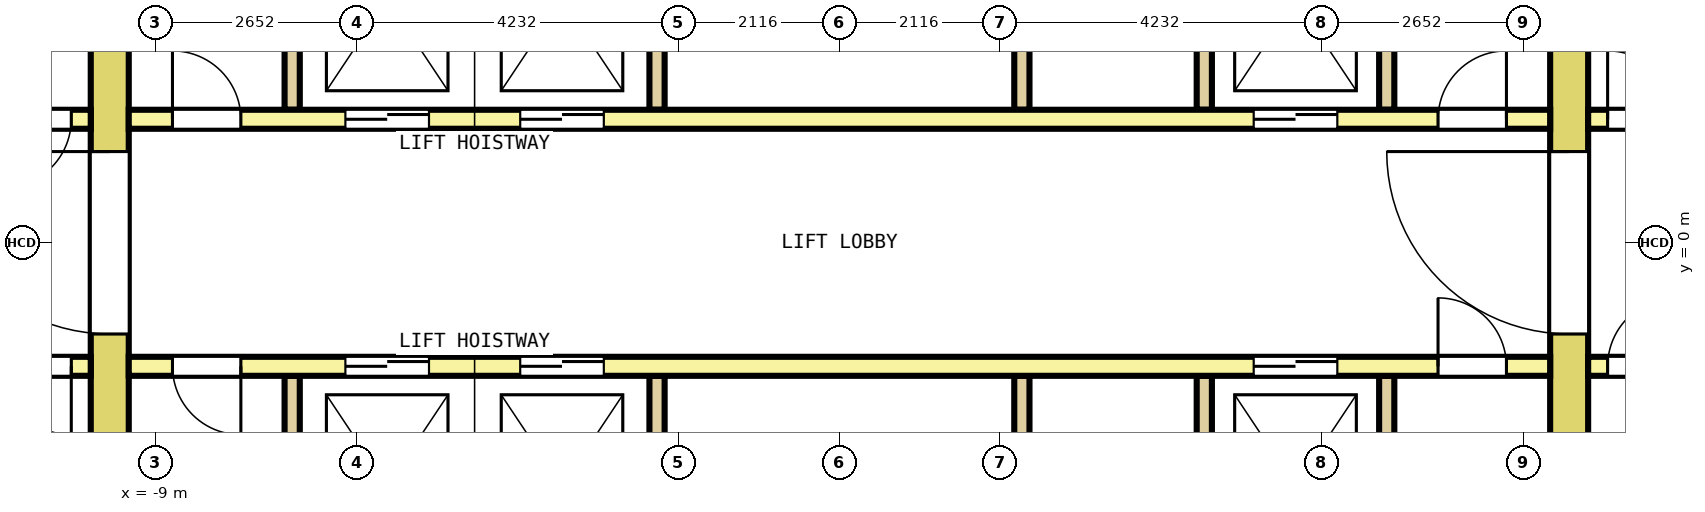
"""IFC4 building model, lengths in metres.
Left out: names, types, materials, properties, quantities, classifications, styles, units other than length and angle.
Written with IfcOpenShell. Run it as: python <this file> out.ifc"""

import sys

from ifc_helpers import new_model, si_unit, direction, frame, frame_2d, origin, place, context, subcontext, project, spatial, rectangle, extrude, element, fill, save


model = new_model("IFC4")
c1 = context("Model", 3, precision=1e-05, world=origin(), true_north=direction((0.0, 1.0)))
c2 = subcontext(c1, "Body", "Model", "MODEL_VIEW")
j1 = project(units=[si_unit("LENGTHUNIT", "METRE"), si_unit("PLANEANGLEUNIT", "RADIAN")], contexts=[c1])
p1 = place(None, origin())
s1 = spatial("IfcSite", under=j1, at=p1, CompositionType="ELEMENT")
p2 = place(p1, origin())
s2 = spatial("IfcBuilding", under=s1, at=p2, CompositionType="ELEMENT")
p3 = place(p2, frame((0.0, 0.0, 122.0)))
s3 = spatial("IfcBuildingStorey", under=s2, at=p3, CompositionType="ELEMENT", Elevation=122.0)
p4 = place(p3, frame((-9.6, -7.7, 0.0), z_axis=(0.0, 0.0, 1.0), x_axis=(0.0, 1.0, 0.0)))
e1 = element("IfcWall", 1, at=p4, inside=s3, PredefinedType="SHEAR", context=c2, shape_type="SweptSolid", body=[
    extrude(rectangle(XDim=15.4, YDim=0.5, at=frame_2d((7.7, 0.0))), origin(), (0.0, 0.0, 1.0), 4.1),
])
p5 = place(p4, frame((6.5, 0.0, 0.0)))
e2 = element("IfcOpeningElement", 2, at=p5, cuts=e1, PredefinedType="OPENING", context=c2, shape_type="SweptSolid", body=[
    extrude(rectangle(XDim=2.4, YDim=2.1, at=frame_2d((1.2, 1.05))), frame((0.0, 0.26, 0.0), z_axis=(0.0, -1.0, 0.0), x_axis=(1.0, 0.0, 0.0)), (0.0, 0.0, 1.0), 0.52),
])
p6 = place(p4, frame((13.4, 0.0, 0.0)))
e3 = element("IfcOpeningElement", 3, at=p6, cuts=e1, PredefinedType="OPENING", context=c2, shape_type="SweptSolid", body=[
    extrude(rectangle(XDim=1.2, YDim=2.1, at=frame_2d((0.6, 1.05))), frame((0.0, 0.26, 0.0), z_axis=(0.0, -1.0, 0.0), x_axis=(1.0, 0.0, 0.0)), (0.0, 0.0, 1.0), 0.52),
])
p7 = place(p4, frame((0.8, 0.0, 0.0)))
e4 = element("IfcOpeningElement", 4, at=p7, cuts=e1, PredefinedType="OPENING", context=c2, shape_type="SweptSolid", body=[
    extrude(rectangle(XDim=1.2, YDim=2.1, at=frame_2d((0.6, 1.05))), frame((0.0, 0.26, 0.0), z_axis=(0.0, -1.0, 0.0), x_axis=(1.0, 0.0, 0.0)), (0.0, 0.0, 1.0), 0.52),
])
p8 = place(p3, frame((9.6, -7.7, 0.0), z_axis=(0.0, 0.0, 1.0), x_axis=(0.0, 1.0, 0.0)))
e5 = element("IfcWall", 5, at=p8, inside=s3, PredefinedType="SHEAR", context=c2, shape_type="SweptSolid", body=[
    extrude(rectangle(XDim=15.4, YDim=0.5, at=frame_2d((7.7, 0.0))), origin(), (0.0, 0.0, 1.0), 4.1),
])
p9 = place(p8, frame((6.5, 0.0, 0.0)))
e6 = element("IfcOpeningElement", 6, at=p9, cuts=e5, PredefinedType="OPENING", context=c2, shape_type="SweptSolid", body=[
    extrude(rectangle(XDim=2.4, YDim=2.1, at=frame_2d((1.2, 1.05))), frame((0.0, 0.26, 0.0), z_axis=(0.0, -1.0, 0.0), x_axis=(1.0, 0.0, 0.0)), (0.0, 0.0, 1.0), 0.52),
])
p10 = place(p8, frame((13.4, 0.0, 0.0)))
e7 = element("IfcOpeningElement", 7, at=p10, cuts=e5, PredefinedType="OPENING", context=c2, shape_type="SweptSolid", body=[
    extrude(rectangle(XDim=1.2, YDim=2.1, at=frame_2d((0.6, 1.05))), frame((0.0, 0.26, 0.0), z_axis=(0.0, -1.0, 0.0), x_axis=(1.0, 0.0, 0.0)), (0.0, 0.0, 1.0), 0.52),
])
p11 = place(p8, frame((0.9, 0.0, 0.0)))
e8 = element("IfcOpeningElement", 8, at=p11, cuts=e5, PredefinedType="OPENING", context=c2, shape_type="SweptSolid", body=[
    extrude(rectangle(XDim=1.0, YDim=2.1, at=frame_2d((0.5, 1.05))), frame((0.0, 0.26, 0.0), z_axis=(0.0, -1.0, 0.0), x_axis=(1.0, 0.0, 0.0)), (0.0, 0.0, 1.0), 0.52),
])
p12 = place(p3, frame((-12.8, 1.625, 0.0), z_axis=(0.0, 0.0, 1.0), x_axis=(1.0, 0.0, 0.0)))
e9 = element("IfcWall", 9, at=p12, inside=s3, PredefinedType="SOLIDWALL", context=c2, shape_type="SweptSolid", body=[
    extrude(rectangle(XDim=2.95, YDim=0.25, at=frame_2d((1.475, 0.0))), origin(), (0.0, 0.0, 1.0), 4.1),
])
p13 = place(p12, frame((0.256, 0.0, 0.0)))
e10 = element("IfcOpeningElement", 10, at=p13, cuts=e9, PredefinedType="OPENING", context=c2, shape_type="SweptSolid", body=[
    extrude(rectangle(XDim=0.9, YDim=2.1, at=frame_2d((0.45, 1.05))), frame((0.0, 0.135, 0.0), z_axis=(0.0, -1.0, 0.0), x_axis=(1.0, 0.0, 0.0)), (0.0, 0.0, 1.0), 0.27),
])
p14 = place(p12, frame((1.794, 0.0, 0.0)))
e11 = element("IfcOpeningElement", 11, at=p14, cuts=e9, PredefinedType="OPENING", context=c2, shape_type="SweptSolid", body=[
    extrude(rectangle(XDim=0.9, YDim=2.1, at=frame_2d((0.45, 1.05))), frame((0.0, 0.135, 0.0), z_axis=(0.0, -1.0, 0.0), x_axis=(1.0, 0.0, 0.0)), (0.0, 0.0, 1.0), 0.27),
])
p15 = place(p3, frame((-9.35, 1.625, 0.0), z_axis=(0.0, 0.0, 1.0), x_axis=(1.0, 0.0, 0.0)))
e12 = element("IfcWall", 12, at=p15, inside=s3, PredefinedType="SOLIDWALL", context=c2, shape_type="SweptSolid", body=[
    extrude(rectangle(XDim=18.7, YDim=0.25, at=frame_2d((9.35, 0.0))), origin(), (0.0, 0.0, 1.0), 4.1),
])
p16 = place(p15, frame((2.85, 0.0, 0.0)))
e13 = element("IfcOpeningElement", 13, at=p16, cuts=e12, PredefinedType="OPENING", context=c2, shape_type="SweptSolid", body=[
    extrude(rectangle(XDim=1.1, YDim=2.1, at=frame_2d((0.55, 1.05))), frame((0.0, 0.135, 0.0), z_axis=(0.0, -1.0, 0.0), x_axis=(1.0, 0.0, 0.0)), (0.0, 0.0, 1.0), 0.27),
])
p17 = place(p15, frame((5.15, 0.0, 0.0)))
e14 = element("IfcOpeningElement", 14, at=p17, cuts=e12, PredefinedType="OPENING", context=c2, shape_type="SweptSolid", body=[
    extrude(rectangle(XDim=1.1, YDim=2.1, at=frame_2d((0.55, 1.05))), frame((0.0, 0.135, 0.0), z_axis=(0.0, -1.0, 0.0), x_axis=(1.0, 0.0, 0.0)), (0.0, 0.0, 1.0), 0.27),
])
p18 = place(p15, frame((14.8, 0.0, 0.0)))
e15 = element("IfcOpeningElement", 15, at=p18, cuts=e12, PredefinedType="OPENING", context=c2, shape_type="SweptSolid", body=[
    extrude(rectangle(XDim=1.1, YDim=2.1, at=frame_2d((0.55, 1.05))), frame((0.0, 0.135, 0.0), z_axis=(0.0, -1.0, 0.0), x_axis=(1.0, 0.0, 0.0)), (0.0, 0.0, 1.0), 0.27),
])
p19 = place(p15, frame((0.575, 0.0, 0.0)))
e16 = element("IfcOpeningElement", 16, at=p19, cuts=e12, PredefinedType="OPENING", context=c2, shape_type="SweptSolid", body=[
    extrude(rectangle(XDim=0.9, YDim=2.1, at=frame_2d((0.45, 1.05))), frame((0.0, 0.135, 0.0), z_axis=(0.0, -1.0, 0.0), x_axis=(1.0, 0.0, 0.0)), (0.0, 0.0, 1.0), 0.27),
])
p20 = place(p15, frame((17.225, 0.0, 0.0)))
e17 = element("IfcOpeningElement", 17, at=p20, cuts=e12, PredefinedType="OPENING", context=c2, shape_type="SweptSolid", body=[
    extrude(rectangle(XDim=0.9, YDim=2.1, at=frame_2d((0.45, 1.05))), frame((0.0, 0.135, 0.0), z_axis=(0.0, -1.0, 0.0), x_axis=(1.0, 0.0, 0.0)), (0.0, 0.0, 1.0), 0.27),
])
p21 = place(p3, frame((9.85, 1.625, 0.0), z_axis=(0.0, 0.0, 1.0), x_axis=(1.0, 0.0, 0.0)))
e18 = element("IfcWall", 18, at=p21, inside=s3, PredefinedType="SOLIDWALL", context=c2, shape_type="SweptSolid", body=[
    extrude(rectangle(XDim=2.95, YDim=0.25, at=frame_2d((1.475, 0.0))), origin(), (0.0, 0.0, 1.0), 4.1),
])
p22 = place(p21, frame((0.256, 0.0, 0.0)))
e19 = element("IfcOpeningElement", 19, at=p22, cuts=e18, PredefinedType="OPENING", context=c2, shape_type="SweptSolid", body=[
    extrude(rectangle(XDim=0.9, YDim=2.1, at=frame_2d((0.45, 1.05))), frame((0.0, 0.135, 0.0), z_axis=(0.0, -1.0, 0.0), x_axis=(1.0, 0.0, 0.0)), (0.0, 0.0, 1.0), 0.27),
])
p23 = place(p21, frame((1.794, 0.0, 0.0)))
e20 = element("IfcOpeningElement", 20, at=p23, cuts=e18, PredefinedType="OPENING", context=c2, shape_type="SweptSolid", body=[
    extrude(rectangle(XDim=0.9, YDim=2.1, at=frame_2d((0.45, 1.05))), frame((0.0, 0.135, 0.0), z_axis=(0.0, -1.0, 0.0), x_axis=(1.0, 0.0, 0.0)), (0.0, 0.0, 1.0), 0.27),
])
for number, where, z_axis, x_axis in (
    (21, (-7.2, 1.75, 0.0), (0.0, 0.0, 1.0), (0.0, 1.0, 0.0)),
    (22, (-2.4, 1.75, 0.0), (0.0, 0.0, 1.0), (0.0, 1.0, 0.0)),
    (23, (2.4, 1.75, 0.0), (0.0, 0.0, 1.0), (0.0, 1.0, 0.0)),
    (24, (4.8, 1.75, 0.0), (0.0, 0.0, 1.0), (0.0, 1.0, 0.0)),
    (25, (7.2, 1.75, 0.0), (0.0, 0.0, 1.0), (0.0, 1.0, 0.0)),
):
    element("IfcWall", number, at=place(p3, frame(where, z_axis=z_axis, x_axis=x_axis)), inside=s3, PredefinedType="SOLIDWALL", context=c2, shape_type="SweptSolid", body=[
        extrude(rectangle(XDim=2.9, YDim=0.2, at=frame_2d((1.45, 0.0))), origin(), (0.0, 0.0, 1.0), 4.1),
    ])
p24 = place(p3, frame((-12.8, -1.625, 0.0), z_axis=(0.0, 0.0, 1.0), x_axis=(1.0, 0.0, 0.0)))
e26 = element("IfcWall", 26, at=p24, inside=s3, PredefinedType="SOLIDWALL", context=c2, shape_type="SweptSolid", body=[
    extrude(rectangle(XDim=2.95, YDim=0.25, at=frame_2d((1.475, 0.0))), origin(), (0.0, 0.0, 1.0), 4.1),
])
p25 = place(p24, frame((0.256, 0.0, 0.0)))
e27 = element("IfcOpeningElement", 27, at=p25, cuts=e26, PredefinedType="OPENING", context=c2, shape_type="SweptSolid", body=[
    extrude(rectangle(XDim=0.9, YDim=2.1, at=frame_2d((0.45, 1.05))), frame((0.0, 0.135, 0.0), z_axis=(0.0, -1.0, 0.0), x_axis=(1.0, 0.0, 0.0)), (0.0, 0.0, 1.0), 0.27),
])
p26 = place(p24, frame((1.794, 0.0, 0.0)))
e28 = element("IfcOpeningElement", 28, at=p26, cuts=e26, PredefinedType="OPENING", context=c2, shape_type="SweptSolid", body=[
    extrude(rectangle(XDim=0.9, YDim=2.1, at=frame_2d((0.45, 1.05))), frame((0.0, 0.135, 0.0), z_axis=(0.0, -1.0, 0.0), x_axis=(1.0, 0.0, 0.0)), (0.0, 0.0, 1.0), 0.27),
])
p27 = place(p3, frame((-9.35, -1.625, 0.0), z_axis=(0.0, 0.0, 1.0), x_axis=(1.0, 0.0, 0.0)))
e29 = element("IfcWall", 29, at=p27, inside=s3, PredefinedType="SOLIDWALL", context=c2, shape_type="SweptSolid", body=[
    extrude(rectangle(XDim=18.7, YDim=0.25, at=frame_2d((9.35, 0.0))), origin(), (0.0, 0.0, 1.0), 4.1),
])
p28 = place(p27, frame((2.85, 0.0, 0.0)))
e30 = element("IfcOpeningElement", 30, at=p28, cuts=e29, PredefinedType="OPENING", context=c2, shape_type="SweptSolid", body=[
    extrude(rectangle(XDim=1.1, YDim=2.1, at=frame_2d((0.55, 1.05))), frame((0.0, 0.135, 0.0), z_axis=(0.0, -1.0, 0.0), x_axis=(1.0, 0.0, 0.0)), (0.0, 0.0, 1.0), 0.27),
])
p29 = place(p27, frame((5.15, 0.0, 0.0)))
e31 = element("IfcOpeningElement", 31, at=p29, cuts=e29, PredefinedType="OPENING", context=c2, shape_type="SweptSolid", body=[
    extrude(rectangle(XDim=1.1, YDim=2.1, at=frame_2d((0.55, 1.05))), frame((0.0, 0.135, 0.0), z_axis=(0.0, -1.0, 0.0), x_axis=(1.0, 0.0, 0.0)), (0.0, 0.0, 1.0), 0.27),
])
p30 = place(p27, frame((14.8, 0.0, 0.0)))
e32 = element("IfcOpeningElement", 32, at=p30, cuts=e29, PredefinedType="OPENING", context=c2, shape_type="SweptSolid", body=[
    extrude(rectangle(XDim=1.1, YDim=2.1, at=frame_2d((0.55, 1.05))), frame((0.0, 0.135, 0.0), z_axis=(0.0, -1.0, 0.0), x_axis=(1.0, 0.0, 0.0)), (0.0, 0.0, 1.0), 0.27),
])
p31 = place(p27, frame((0.575, 0.0, 0.0)))
e33 = element("IfcOpeningElement", 33, at=p31, cuts=e29, PredefinedType="OPENING", context=c2, shape_type="SweptSolid", body=[
    extrude(rectangle(XDim=0.9, YDim=2.1, at=frame_2d((0.45, 1.05))), frame((0.0, 0.135, 0.0), z_axis=(0.0, -1.0, 0.0), x_axis=(1.0, 0.0, 0.0)), (0.0, 0.0, 1.0), 0.27),
])
p32 = place(p27, frame((17.225, 0.0, 0.0)))
e34 = element("IfcOpeningElement", 34, at=p32, cuts=e29, PredefinedType="OPENING", context=c2, shape_type="SweptSolid", body=[
    extrude(rectangle(XDim=0.9, YDim=2.1, at=frame_2d((0.45, 1.05))), frame((0.0, 0.135, 0.0), z_axis=(0.0, -1.0, 0.0), x_axis=(1.0, 0.0, 0.0)), (0.0, 0.0, 1.0), 0.27),
])
p33 = place(p3, frame((9.85, -1.625, 0.0), z_axis=(0.0, 0.0, 1.0), x_axis=(1.0, 0.0, 0.0)))
e35 = element("IfcWall", 35, at=p33, inside=s3, PredefinedType="SOLIDWALL", context=c2, shape_type="SweptSolid", body=[
    extrude(rectangle(XDim=2.95, YDim=0.25, at=frame_2d((1.475, 0.0))), origin(), (0.0, 0.0, 1.0), 4.1),
])
p34 = place(p33, frame((0.256, 0.0, 0.0)))
e36 = element("IfcOpeningElement", 36, at=p34, cuts=e35, PredefinedType="OPENING", context=c2, shape_type="SweptSolid", body=[
    extrude(rectangle(XDim=0.9, YDim=2.1, at=frame_2d((0.45, 1.05))), frame((0.0, 0.135, 0.0), z_axis=(0.0, -1.0, 0.0), x_axis=(1.0, 0.0, 0.0)), (0.0, 0.0, 1.0), 0.27),
])
p35 = place(p33, frame((1.794, 0.0, 0.0)))
e37 = element("IfcOpeningElement", 37, at=p35, cuts=e35, PredefinedType="OPENING", context=c2, shape_type="SweptSolid", body=[
    extrude(rectangle(XDim=0.9, YDim=2.1, at=frame_2d((0.45, 1.05))), frame((0.0, 0.135, 0.0), z_axis=(0.0, -1.0, 0.0), x_axis=(1.0, 0.0, 0.0)), (0.0, 0.0, 1.0), 0.27),
])
for number, where, z_axis, x_axis in (
    (38, (-7.2, -4.65, 0.0), (0.0, 0.0, 1.0), (0.0, 1.0, 0.0)),
    (39, (-2.4, -4.65, 0.0), (0.0, 0.0, 1.0), (0.0, 1.0, 0.0)),
    (40, (2.4, -4.65, 0.0), (0.0, 0.0, 1.0), (0.0, 1.0, 0.0)),
    (41, (4.8, -4.65, 0.0), (0.0, 0.0, 1.0), (0.0, 1.0, 0.0)),
    (42, (7.2, -4.65, 0.0), (0.0, 0.0, 1.0), (0.0, 1.0, 0.0)),
):
    element("IfcWall", number, at=place(p3, frame(where, z_axis=z_axis, x_axis=x_axis)), inside=s3, PredefinedType="SOLIDWALL", context=c2, shape_type="SweptSolid", body=[
        extrude(rectangle(XDim=2.9, YDim=0.2, at=frame_2d((1.45, 0.0))), origin(), (0.0, 0.0, 1.0), 4.1),
    ])
p36 = place(p16, origin())
e43 = element("IfcDoor", 43, at=p36, inside=s3, OperationType="DOUBLE_DOOR_SLIDING", PredefinedType="DOOR", context=c2, shape_type="SweptSolid", body=[
    extrude(rectangle(XDim=1.1, YDim=2.1, at=frame_2d((0.55, 1.05))), frame((0.0, 0.075, 0.0), z_axis=(0.0, -1.0, 0.0), x_axis=(1.0, 0.0, 0.0)), (0.0, 0.0, 1.0), 0.15),
])
fill(e13, e43)
p37 = place(p17, origin())
e44 = element("IfcDoor", 44, at=p37, inside=s3, OperationType="DOUBLE_DOOR_SLIDING", PredefinedType="DOOR", context=c2, shape_type="SweptSolid", body=[
    extrude(rectangle(XDim=1.1, YDim=2.1, at=frame_2d((0.55, 1.05))), frame((0.0, 0.075, 0.0), z_axis=(0.0, -1.0, 0.0), x_axis=(1.0, 0.0, 0.0)), (0.0, 0.0, 1.0), 0.15),
])
fill(e14, e44)
p38 = place(p18, origin())
e45 = element("IfcDoor", 45, at=p38, inside=s3, OperationType="DOUBLE_DOOR_SLIDING", PredefinedType="DOOR", context=c2, shape_type="SweptSolid", body=[
    extrude(rectangle(XDim=1.1, YDim=2.1, at=frame_2d((0.55, 1.05))), frame((0.0, 0.075, 0.0), z_axis=(0.0, -1.0, 0.0), x_axis=(1.0, 0.0, 0.0)), (0.0, 0.0, 1.0), 0.15),
])
fill(e15, e45)
p39 = place(p28, origin())
e46 = element("IfcDoor", 46, at=p39, inside=s3, OperationType="DOUBLE_DOOR_SLIDING", PredefinedType="DOOR", context=c2, shape_type="SweptSolid", body=[
    extrude(rectangle(XDim=1.1, YDim=2.1, at=frame_2d((0.55, 1.05))), frame((0.0, 0.075, 0.0), z_axis=(0.0, -1.0, 0.0), x_axis=(1.0, 0.0, 0.0)), (0.0, 0.0, 1.0), 0.15),
])
fill(e30, e46)
p40 = place(p29, origin())
e47 = element("IfcDoor", 47, at=p40, inside=s3, OperationType="DOUBLE_DOOR_SLIDING", PredefinedType="DOOR", context=c2, shape_type="SweptSolid", body=[
    extrude(rectangle(XDim=1.1, YDim=2.1, at=frame_2d((0.55, 1.05))), frame((0.0, 0.075, 0.0), z_axis=(0.0, -1.0, 0.0), x_axis=(1.0, 0.0, 0.0)), (0.0, 0.0, 1.0), 0.15),
])
fill(e31, e47)
p41 = place(p30, origin())
e48 = element("IfcDoor", 48, at=p41, inside=s3, OperationType="DOUBLE_DOOR_SLIDING", PredefinedType="DOOR", context=c2, shape_type="SweptSolid", body=[
    extrude(rectangle(XDim=1.1, YDim=2.1, at=frame_2d((0.55, 1.05))), frame((0.0, 0.075, 0.0), z_axis=(0.0, -1.0, 0.0), x_axis=(1.0, 0.0, 0.0)), (0.0, 0.0, 1.0), 0.15),
])
fill(e32, e48)
p42 = place(p5, origin())
e49 = element("IfcDoor", 49, at=p42, inside=s3, OperationType="DOUBLE_DOOR_SINGLE_SWING", PredefinedType="DOOR", context=c2, shape_type="SweptSolid", body=[
    extrude(rectangle(XDim=2.4, YDim=2.1, at=frame_2d((1.2, 1.05))), frame((0.0, 0.2, 0.0), z_axis=(0.0, -1.0, 0.0), x_axis=(1.0, 0.0, 0.0)), (0.0, 0.0, 1.0), 0.4),
])
fill(e2, e49)
p43 = place(p9, origin())
e50 = element("IfcDoor", 50, at=p43, inside=s3, OperationType="DOUBLE_DOOR_SINGLE_SWING", PredefinedType="DOOR", context=c2, shape_type="SweptSolid", body=[
    extrude(rectangle(XDim=2.4, YDim=2.1, at=frame_2d((1.2, 1.05))), frame((0.0, 0.2, 0.0), z_axis=(0.0, -1.0, 0.0), x_axis=(1.0, 0.0, 0.0)), (0.0, 0.0, 1.0), 0.4),
])
fill(e6, e50)
p44 = place(p14, origin())
e51 = element("IfcDoor", 51, at=p44, inside=s3, OperationType="SINGLE_SWING_LEFT", PredefinedType="DOOR", context=c2, shape_type="SweptSolid", body=[
    extrude(rectangle(XDim=0.9, YDim=2.1, at=frame_2d((0.45, 1.05))), frame((0.0, 0.075, 0.0), z_axis=(0.0, -1.0, 0.0), x_axis=(1.0, 0.0, 0.0)), (0.0, 0.0, 1.0), 0.15),
])
fill(e11, e51)
p45 = place(p19, origin())
e52 = element("IfcDoor", 52, at=p45, inside=s3, OperationType="SINGLE_SWING_RIGHT", PredefinedType="DOOR", context=c2, shape_type="SweptSolid", body=[
    extrude(rectangle(XDim=0.9, YDim=2.1, at=frame_2d((0.45, 1.05))), frame((0.0, 0.075, 0.0), z_axis=(0.0, -1.0, 0.0), x_axis=(1.0, 0.0, 0.0)), (0.0, 0.0, 1.0), 0.15),
])
fill(e16, e52)
p46 = place(p20, origin())
e53 = element("IfcDoor", 53, at=p46, inside=s3, OperationType="SINGLE_SWING_LEFT", PredefinedType="DOOR", context=c2, shape_type="SweptSolid", body=[
    extrude(rectangle(XDim=0.9, YDim=2.1, at=frame_2d((0.45, 1.05))), frame((0.0, 0.075, 0.0), z_axis=(0.0, -1.0, 0.0), x_axis=(1.0, 0.0, 0.0)), (0.0, 0.0, 1.0), 0.15),
])
fill(e17, e53)
p47 = place(p22, origin())
e54 = element("IfcDoor", 54, at=p47, inside=s3, OperationType="SINGLE_SWING_RIGHT", PredefinedType="DOOR", context=c2, shape_type="SweptSolid", body=[
    extrude(rectangle(XDim=0.9, YDim=2.1, at=frame_2d((0.45, 1.05))), frame((0.0, 0.075, 0.0), z_axis=(0.0, -1.0, 0.0), x_axis=(1.0, 0.0, 0.0)), (0.0, 0.0, 1.0), 0.15),
])
fill(e19, e54)
p48 = place(p26, origin())
e55 = element("IfcDoor", 55, at=p48, inside=s3, OperationType="SINGLE_SWING_LEFT", PredefinedType="DOOR", context=c2, shape_type="SweptSolid", body=[
    extrude(rectangle(XDim=0.9, YDim=2.1, at=frame_2d((0.45, 1.05))), frame((0.0, 0.075, 0.0), z_axis=(0.0, -1.0, 0.0), x_axis=(1.0, 0.0, 0.0)), (0.0, 0.0, 1.0), 0.15),
])
fill(e28, e55)
p49 = place(p31, origin())
e56 = element("IfcDoor", 56, at=p49, inside=s3, OperationType="SINGLE_SWING_RIGHT", PredefinedType="DOOR", context=c2, shape_type="SweptSolid", body=[
    extrude(rectangle(XDim=0.9, YDim=2.1, at=frame_2d((0.45, 1.05))), frame((0.0, 0.075, 0.0), z_axis=(0.0, -1.0, 0.0), x_axis=(1.0, 0.0, 0.0)), (0.0, 0.0, 1.0), 0.15),
])
fill(e33, e56)
p50 = place(p32, origin())
e57 = element("IfcDoor", 57, at=p50, inside=s3, OperationType="SINGLE_SWING_LEFT", PredefinedType="DOOR", context=c2, shape_type="SweptSolid", body=[
    extrude(rectangle(XDim=0.9, YDim=2.1, at=frame_2d((0.45, 1.05))), frame((0.0, 0.075, 0.0), z_axis=(0.0, -1.0, 0.0), x_axis=(1.0, 0.0, 0.0)), (0.0, 0.0, 1.0), 0.15),
])
fill(e34, e57)
p51 = place(p34, origin())
e58 = element("IfcDoor", 58, at=p51, inside=s3, OperationType="SINGLE_SWING_RIGHT", PredefinedType="DOOR", context=c2, shape_type="SweptSolid", body=[
    extrude(rectangle(XDim=0.9, YDim=2.1, at=frame_2d((0.45, 1.05))), frame((0.0, 0.075, 0.0), z_axis=(0.0, -1.0, 0.0), x_axis=(1.0, 0.0, 0.0)), (0.0, 0.0, 1.0), 0.15),
])
fill(e36, e58)
save(model, sys.argv[1])
